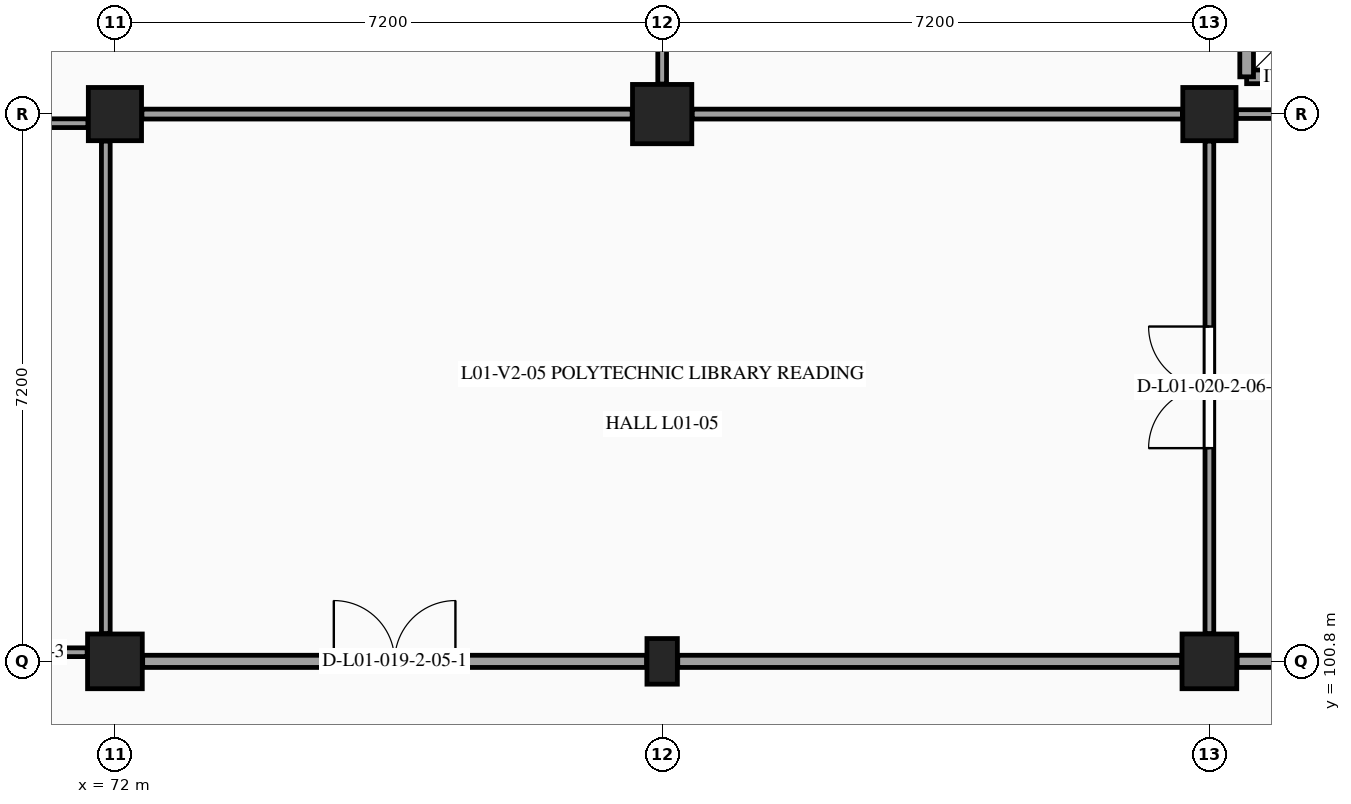
"""IFC4 building model, lengths in metres.
Left out: names, types, materials, properties, quantities, classifications, styles, units other than length and angle.
Written with IfcOpenShell. Run it as: python <this file> out.ifc"""

import sys

from ifc_helpers import new_model, si_unit, direction, frame, frame_2d, origin, origin_2d, place, context, subcontext, project, spatial, rectangle, extrude, element, fill, save


model = new_model("IFC4")
c1 = context("Model", 3, precision=1e-05, world=origin(), true_north=direction((0.0, 1.0)))
c2 = subcontext(c1, "Body", "Model", "MODEL_VIEW")
j1 = project(units=[si_unit("LENGTHUNIT", "METRE"), si_unit("PLANEANGLEUNIT", "RADIAN")], contexts=[c1])
p1 = place(None, origin())
s1 = spatial("IfcSite", under=j1, at=p1, CompositionType="ELEMENT")
p2 = place(p1, origin())
s2 = spatial("IfcBuilding", under=s1, at=p2, CompositionType="ELEMENT")
p3 = place(p2, frame((0.0, 0.0, 5.4)))
s3 = spatial("IfcBuildingStorey", under=s2, at=p3, CompositionType="ELEMENT", Elevation=5.4)
p4 = place(p3, frame((72.0, 100.8, 0.0), z_axis=(0.0, 0.0, 1.0), x_axis=(1.0, 0.0, 0.0)))
e1 = element("IfcColumn", 1, at=p4, inside=s3, PredefinedType="COLUMN", context=c2, shape_type="SweptSolid", body=[
    extrude(rectangle(XDim=0.72, YDim=0.72, at=origin_2d()), origin(), (0.0, 0.0, 1.0), 4.5),
])
p5 = place(p3, frame((72.0, 108.0, 0.0), z_axis=(0.0, 0.0, 1.0), x_axis=(1.0, 0.0, 0.0)))
e2 = element("IfcColumn", 2, at=p5, inside=s3, PredefinedType="COLUMN", context=c2, shape_type="SweptSolid", body=[
    extrude(rectangle(XDim=0.7, YDim=0.7, at=origin_2d()), origin(), (0.0, 0.0, 1.0), 4.5),
])
p6 = place(p3, frame((79.2, 100.8, 0.0), z_axis=(0.0, 0.0, 1.0), x_axis=(1.0, 0.0, 0.0)))
e3 = element("IfcColumn", 3, at=p6, inside=s3, PredefinedType="PILASTER", context=c2, shape_type="SweptSolid", body=[
    extrude(rectangle(XDim=0.4, YDim=0.6, at=origin_2d()), origin(), (0.0, 0.0, 1.0), 4.5),
])
p7 = place(p3, frame((79.2, 108.0, 0.0), z_axis=(0.0, 0.0, 1.0), x_axis=(1.0, 0.0, 0.0)))
e4 = element("IfcColumn", 4, at=p7, inside=s3, PredefinedType="COLUMN", context=c2, shape_type="SweptSolid", body=[
    extrude(rectangle(XDim=0.78, YDim=0.78, at=origin_2d()), origin(), (0.0, 0.0, 1.0), 4.5),
])
p8 = place(p3, frame((86.4, 100.8, 0.0), z_axis=(0.0, 0.0, 1.0), x_axis=(1.0, 0.0, 0.0)))
e5 = element("IfcColumn", 5, at=p8, inside=s3, PredefinedType="COLUMN", context=c2, shape_type="SweptSolid", body=[
    extrude(rectangle(XDim=0.72, YDim=0.72, at=origin_2d()), origin(), (0.0, 0.0, 1.0), 4.5),
])
p9 = place(p3, frame((86.4, 108.0, 0.0), z_axis=(0.0, 0.0, 1.0), x_axis=(1.0, 0.0, 0.0)))
e6 = element("IfcColumn", 6, at=p9, inside=s3, PredefinedType="COLUMN", context=c2, shape_type="SweptSolid", body=[
    extrude(rectangle(XDim=0.7, YDim=0.7, at=origin_2d()), origin(), (0.0, 0.0, 1.0), 4.5),
])
p10 = place(p3, frame((65.005, 100.92, 0.0), z_axis=(0.0, 0.0, 1.0), x_axis=(1.0, 0.0, 0.0)))
e7 = element("IfcWall", 7, at=p10, inside=s3, PredefinedType="PARTITIONING", context=c2, shape_type="SweptSolid", body=[
    extrude(rectangle(XDim=6.63, YDim=0.115, at=frame_2d((3.315, 0.0))), origin(), (0.0, 0.0, 1.0), 3.43),
])
p11 = place(p10, frame((0.795, 0.0, 0.0)))
e8 = element("IfcOpeningElement", 8, at=p11, cuts=e7, PredefinedType="OPENING", context=c2, shape_type="SweptSolid", body=[
    extrude(rectangle(XDim=0.95, YDim=2.1, at=frame_2d((0.475, 1.05))), frame((0.0, 0.067, 0.0), z_axis=(0.0, -1.0, 0.0), x_axis=(1.0, 0.0, 0.0)), (0.0, 0.0, 1.0), 0.135),
])
p12 = place(p10, frame((2.895, 0.0, 0.0)))
e9 = element("IfcOpeningElement", 9, at=p12, cuts=e7, PredefinedType="OPENING", context=c2, shape_type="SweptSolid", body=[
    extrude(rectangle(XDim=0.95, YDim=2.1, at=frame_2d((0.475, 1.05))), frame((0.0, 0.067, 0.0), z_axis=(0.0, -1.0, 0.0), x_axis=(1.0, 0.0, 0.0)), (0.0, 0.0, 1.0), 0.135),
])
p13 = place(p10, frame((5.045, 0.0, 0.0)))
e10 = element("IfcOpeningElement", 10, at=p13, cuts=e7, PredefinedType="OPENING", context=c2, shape_type="SweptSolid", body=[
    extrude(rectangle(XDim=1.0, YDim=2.15, at=frame_2d((0.5, 1.075))), frame((0.0, 0.067, 0.0), z_axis=(0.0, -1.0, 0.0), x_axis=(1.0, 0.0, 0.0)), (0.0, 0.0, 1.0), 0.135),
])
p14 = place(p3, frame((65.195, 107.88, 0.0), z_axis=(0.0, 0.0, 1.0), x_axis=(1.0, 0.0, 0.0)))
e11 = element("IfcWall", 11, at=p14, inside=s3, PredefinedType="PARTITIONING", context=c2, shape_type="SweptSolid", body=[
    extrude(rectangle(XDim=6.45, YDim=0.115, at=frame_2d((3.225, 0.0))), origin(), (0.0, 0.0, 1.0), 3.43),
])
p15 = place(p3, frame((71.88, 101.165, 0.0), z_axis=(0.0, 0.0, 1.0), x_axis=(0.0, 1.0, 0.0)))
e12 = element("IfcWall", 12, at=p15, inside=s3, PredefinedType="PARTITIONING", context=c2, shape_type="SweptSolid", body=[
    extrude(rectangle(XDim=6.48, YDim=0.115, at=frame_2d((3.24, 0.0))), origin(), (0.0, 0.0, 1.0), 3.525),
])
for number, where, z_axis, x_axis in (
    (13, (86.89, 108.49, 0.0), (0.0, 0.0, 1.0), (1.0, 0.0, 0.0)),
    (14, (86.89, 109.51, 0.0), (0.0, 0.0, 1.0), (0.0, -1.0, 0.0)),
):
    element("IfcWall", number, at=place(p3, frame(where, z_axis=z_axis, x_axis=x_axis)), inside=s3, PredefinedType="PARTITIONING", context=c2, shape_type="SweptSolid", body=[
        extrude(rectangle(XDim=1.02, YDim=0.18, at=frame_2d((0.51, 0.0))), origin(), (0.0, 0.0, 1.0), 4.21),
    ])
p16 = place(p3, frame((72.365, 100.8, 0.0), z_axis=(0.0, 0.0, 1.0), x_axis=(1.0, 0.0, 0.0)))
e15 = element("IfcWall", 15, at=p16, inside=s3, PredefinedType="PARTITIONING", context=c2, shape_type="SweptSolid", body=[
    extrude(rectangle(XDim=6.63, YDim=0.16, at=frame_2d((3.315, 0.0))), origin(), (0.0, 0.0, 1.0), 3.46),
])
p17 = place(p16, frame((2.515, 0.0, 0.0)))
e16 = element("IfcOpeningElement", 16, at=p17, cuts=e15, PredefinedType="OPENING", context=c2, shape_type="SweptSolid", body=[
    extrude(rectangle(XDim=1.6, YDim=2.2, at=frame_2d((0.8, 1.1))), frame((0.0, 0.09, 0.0), z_axis=(0.0, -1.0, 0.0), x_axis=(1.0, 0.0, 0.0)), (0.0, 0.0, 1.0), 0.18),
])
p18 = place(p3, frame((72.355, 108.0, 0.0), z_axis=(0.0, 0.0, 1.0), x_axis=(1.0, 0.0, 0.0)))
e17 = element("IfcWall", 17, at=p18, inside=s3, PredefinedType="PARTITIONING", context=c2, shape_type="SweptSolid", body=[
    extrude(rectangle(XDim=6.45, YDim=0.13, at=frame_2d((3.225, 0.0))), origin(), (0.0, 0.0, 1.0), 3.46),
])
p19 = place(p3, frame((79.2, 108.395, 0.0), z_axis=(0.0, 0.0, 1.0), x_axis=(0.0, 1.0, 0.0)))
e18 = element("IfcWall", 18, at=p19, inside=s3, PredefinedType="PARTITIONING", context=c2, shape_type="SweptSolid", body=[
    extrude(rectangle(XDim=6.425, YDim=0.115, at=frame_2d((3.212, 0.0))), origin(), (0.0, 0.0, 1.0), 3.525),
])
p20 = place(p19, frame((2.252, 0.0, 0.0)))
e19 = element("IfcOpeningElement", 19, at=p20, cuts=e18, PredefinedType="OPENING", context=c2, shape_type="SweptSolid", body=[
    extrude(rectangle(XDim=1.92, YDim=2.35, at=frame_2d((0.96, 1.175))), frame((0.0, 0.067, 0.0), z_axis=(0.0, -1.0, 0.0), x_axis=(1.0, 0.0, 0.0)), (0.0, 0.0, 1.0), 0.135),
])
p21 = place(p3, frame((79.405, 100.8, 0.0), z_axis=(0.0, 0.0, 1.0), x_axis=(1.0, 0.0, 0.0)))
e20 = element("IfcWall", 20, at=p21, inside=s3, PredefinedType="PARTITIONING", context=c2, shape_type="SweptSolid", body=[
    extrude(rectangle(XDim=6.63, YDim=0.16, at=frame_2d((3.315, 0.0))), origin(), (0.0, 0.0, 1.0), 3.47),
])
p22 = place(p3, frame((86.4, 101.165, 0.0), z_axis=(0.0, 0.0, 1.0), x_axis=(0.0, 1.0, 0.0)))
e21 = element("IfcWall", 21, at=p22, inside=s3, PredefinedType="PARTITIONING", context=c2, shape_type="SweptSolid", body=[
    extrude(rectangle(XDim=6.48, YDim=0.115, at=frame_2d((3.24, 0.0))), origin(), (0.0, 0.0, 1.0), 3.525),
])
p23 = place(p22, frame((2.44, 0.0, 0.0)))
e22 = element("IfcOpeningElement", 22, at=p23, cuts=e21, PredefinedType="OPENING", context=c2, shape_type="SweptSolid", body=[
    extrude(rectangle(XDim=1.6, YDim=2.2, at=frame_2d((0.8, 1.1))), frame((0.0, 0.067, 0.0), z_axis=(0.0, -1.0, 0.0), x_axis=(1.0, 0.0, 0.0)), (0.0, 0.0, 1.0), 0.135),
])
p24 = place(p3, frame((79.595, 108.0, 0.0), z_axis=(0.0, 0.0, 1.0), x_axis=(1.0, 0.0, 0.0)))
e23 = element("IfcWall", 23, at=p24, inside=s3, PredefinedType="PARTITIONING", context=c2, shape_type="SweptSolid", body=[
    extrude(rectangle(XDim=6.45, YDim=0.13, at=frame_2d((3.225, 0.0))), origin(), (0.0, 0.0, 1.0), 3.47),
])
p25 = place(p3, frame((86.765, 100.8, 0.0), z_axis=(0.0, 0.0, 1.0), x_axis=(1.0, 0.0, 0.0)))
e24 = element("IfcWall", 24, at=p25, inside=s3, PredefinedType="PARTITIONING", context=c2, shape_type="SweptSolid", body=[
    extrude(rectangle(XDim=6.63, YDim=0.16, at=frame_2d((3.315, 0.0))), origin(), (0.0, 0.0, 1.0), 3.485),
])
p26 = place(p3, frame((86.755, 108.0, 0.0), z_axis=(0.0, 0.0, 1.0), x_axis=(1.0, 0.0, 0.0)))
e25 = element("IfcWall", 25, at=p26, inside=s3, PredefinedType="PARTITIONING", context=c2, shape_type="SweptSolid", body=[
    extrude(rectangle(XDim=6.45, YDim=0.115, at=frame_2d((3.225, 0.0))), origin(), (0.0, 0.0, 1.0), 3.485),
])
p27 = place(p17, origin())
e26 = element("IfcDoor", 26, at=p27, inside=s3, OperationType="DOUBLE_DOOR_SINGLE_SWING", PredefinedType="DOOR", context=c2, shape_type="SweptSolid", body=[
    extrude(rectangle(XDim=1.6, YDim=2.2, at=frame_2d((0.8, 1.1))), frame((0.0, 0.025, 0.0), z_axis=(0.0, -1.0, 0.0), x_axis=(1.0, 0.0, 0.0)), (0.0, 0.0, 1.0), 0.05),
])
fill(e16, e26)
p28 = place(p23, origin())
e27 = element("IfcDoor", 27, at=p28, inside=s3, OperationType="DOUBLE_DOOR_SINGLE_SWING", PredefinedType="DOOR", context=c2, shape_type="SweptSolid", body=[
    extrude(rectangle(XDim=1.6, YDim=2.2, at=frame_2d((0.8, 1.1))), frame((0.0, 0.025, 0.0), z_axis=(0.0, -1.0, 0.0), x_axis=(1.0, 0.0, 0.0)), (0.0, 0.0, 1.0), 0.05),
])
fill(e22, e27)
save(model, sys.argv[1])
